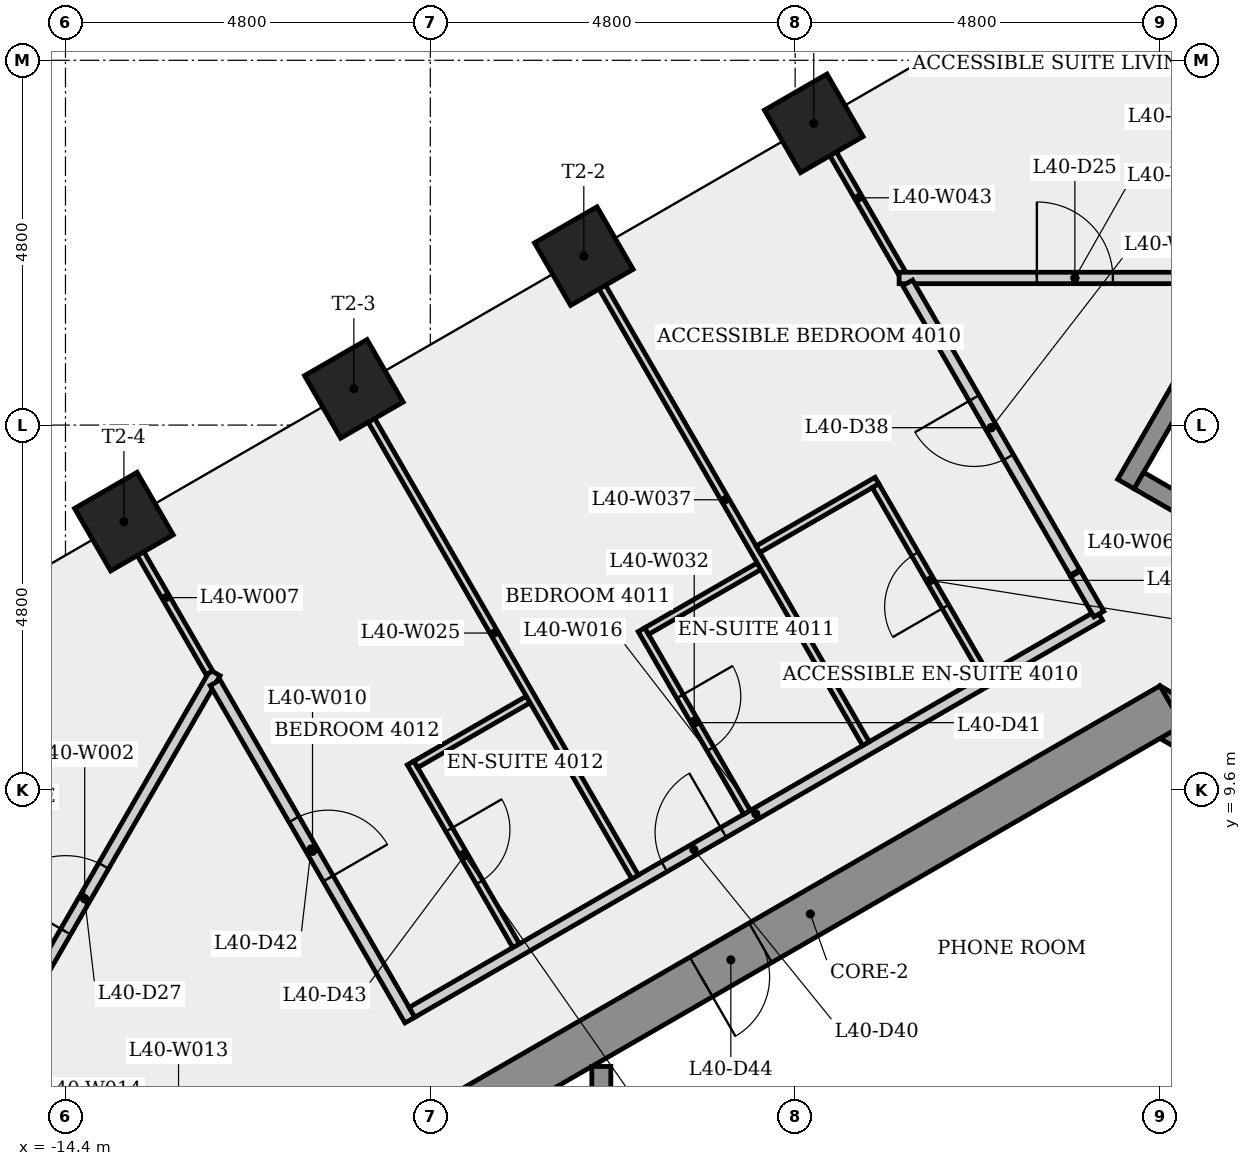
"""IFC4 building model, lengths in metres.
Left out: names, types, materials, properties, quantities, classifications, styles, units other than length and angle.
Written with IfcOpenShell. Run it as: python <this file> out.ifc"""

import sys

from ifc_helpers import new_model, si_unit, direction, frame, frame_2d, origin, origin_2d, place, context, subcontext, project, spatial, rectangle, extrude, element, fill, save


model = new_model("IFC4")
c1 = context("Model", 3, precision=1e-05, world=origin(), true_north=direction((0.0, 1.0)))
c2 = subcontext(c1, "Body", "Model", "MODEL_VIEW")
j1 = project(units=[si_unit("LENGTHUNIT", "METRE"), si_unit("PLANEANGLEUNIT", "RADIAN")], contexts=[c1])
p1 = place(None, origin())
s1 = spatial("IfcSite", under=j1, at=p1, CompositionType="ELEMENT")
p2 = place(p1, origin())
s2 = spatial("IfcBuilding", under=s1, at=p2, CompositionType="ELEMENT")
p3 = place(p2, frame((0.0, 0.0, 152.7)))
s3 = spatial("IfcBuildingStorey", under=s2, at=p3, CompositionType="ELEMENT", Elevation=152.7)
p4 = place(p3, frame((9.35, 5.225, 0.0), z_axis=(0.0, 0.0, 1.0), x_axis=(-0.866023993627, 0.500002442456, 0.0)))
e1 = element("IfcWall", 1, at=p4, inside=s3, PredefinedType="SHEAR", context=c2, shape_type="SweptSolid", body=[
    extrude(rectangle(XDim=10.97, YDim=0.6, at=frame_2d((5.485, 0.0))), origin(), (0.0, 0.0, 1.0), 3.4),
])
p5 = place(p4, frame((7.518, 0.0, 0.0)))
e2 = element("IfcOpeningElement", 2, at=p5, cuts=e1, PredefinedType="OPENING", context=c2, shape_type="SweptSolid", body=[
    extrude(rectangle(XDim=0.9, YDim=2.1, at=frame_2d((0.45, 1.05))), frame((0.0, 0.31, 0.0), z_axis=(0.0, -1.0, 0.0), x_axis=(1.0, 0.0, 0.0)), (0.0, 0.0, 1.0), 0.62),
])
p6 = place(p4, frame((1.172, 0.0, 0.0)))
e3 = element("IfcOpeningElement", 3, at=p6, cuts=e1, PredefinedType="OPENING", context=c2, shape_type="SweptSolid", body=[
    extrude(rectangle(XDim=0.9, YDim=2.1, at=frame_2d((0.45, 1.05))), frame((0.0, 0.31, 0.0), z_axis=(0.0, -1.0, 0.0), x_axis=(1.0, 0.0, 0.0)), (0.0, 0.0, 1.0), 0.62),
])
p7 = place(p3, frame((0.15, 10.71, 0.0), z_axis=(0.0, 0.0, 1.0), x_axis=(-0.866023993627, -0.500002442456, 0.0)))
e4 = element("IfcWall", 4, at=p7, inside=s3, PredefinedType="SHEAR", context=c2, shape_type="SweptSolid", body=[
    extrude(rectangle(XDim=10.97, YDim=0.6, at=frame_2d((5.485, 0.0))), origin(), (0.0, 0.0, 1.0), 3.4),
])
p8 = place(p7, frame((6.243, 0.0, 0.0)))
e5 = element("IfcOpeningElement", 5, at=p8, cuts=e4, PredefinedType="OPENING", context=c2, shape_type="SweptSolid", body=[
    extrude(rectangle(XDim=0.9, YDim=2.1, at=frame_2d((0.45, 1.05))), frame((0.0, 0.31, 0.0), z_axis=(0.0, -1.0, 0.0), x_axis=(1.0, 0.0, 0.0)), (0.0, 0.0, 1.0), 0.62),
])
for number, where, z_axis, x_axis in (
    (6, (-4.555, 18.37, 0.0), (0.0, 0.0, 1.0), (-0.5, 0.866, 0.0)),
    (7, (-7.581, 16.623, 0.0), (0.0, 0.0, 1.0), (-0.5, 0.866, 0.0)),
    (8, (-10.606, 14.877, 0.0), (0.0, 0.0, 1.0), (-0.5, 0.866, 0.0)),
    (9, (-13.631, 13.13, 0.0), (0.0, 0.0, 1.0), (-0.5, 0.866, 0.0)),
):
    element("IfcColumn", number, at=place(p3, frame(where, z_axis=z_axis, x_axis=x_axis)), inside=s3, PredefinedType="COLUMN", context=c2, shape_type="SweptSolid", body=[
        extrude(rectangle(XDim=0.95, YDim=0.95, at=origin_2d()), origin(), (0.0, 0.0, 1.0), 3.4),
    ])
p9 = place(p3, frame((-15.863, 5.196, 0.0), z_axis=(0.0, 0.0, 1.0), x_axis=(0.499991347294, 0.866030399369, 0.0)))
e10 = element("IfcWall", 10, at=p9, inside=s3, PredefinedType="PARTITIONING", context=c2, shape_type="SweptSolid", body=[
    extrude(rectangle(XDim=6.864, YDim=0.15, at=frame_2d((3.432, 0.0))), origin(), (0.0, 0.0, 1.0), 3.05),
])
p10 = place(p9, frame((2.932, 0.0, 0.0)))
e11 = element("IfcOpeningElement", 11, at=p10, cuts=e10, PredefinedType="OPENING", context=c2, shape_type="SweptSolid", body=[
    extrude(rectangle(XDim=1.0, YDim=2.1, at=frame_2d((0.5, 1.05))), frame((0.0, 0.085, 0.0), z_axis=(0.0, -1.0, 0.0), x_axis=(1.0, 0.0, 0.0)), (0.0, 0.0, 1.0), 0.17),
])
p11 = place(p3, frame((-13.649, 13.12, 0.0), z_axis=(0.0, 0.0, 1.0), x_axis=(0.499987504325, -0.866032618045, 0.0)))
e12 = element("IfcWall", 12, at=p11, inside=s3, PredefinedType="PARTITIONING", context=c2, shape_type="SweptSolid", body=[
    extrude(rectangle(XDim=2.286, YDim=0.1, at=frame_2d((1.143, 0.0))), origin(), (0.0, 0.0, 1.0), 3.05),
])
p12 = place(p3, frame((-12.431, 11.01, 0.0), z_axis=(0.0, 0.0, 1.0), x_axis=(0.500001430823, -0.866024577697, 0.0)))
e13 = element("IfcWall", 13, at=p12, inside=s3, PredefinedType="PARTITIONING", context=c2, shape_type="SweptSolid", body=[
    extrude(rectangle(XDim=5.126, YDim=0.15, at=frame_2d((2.563, 0.0))), origin(), (0.0, 0.0, 1.0), 3.05),
])
p13 = place(p12, frame((2.075, 0.0, 0.0)))
e14 = element("IfcOpeningElement", 14, at=p13, cuts=e13, PredefinedType="OPENING", context=c2, shape_type="SweptSolid", body=[
    extrude(rectangle(XDim=0.9, YDim=2.1, at=frame_2d((0.45, 1.05))), frame((0.0, 0.085, 0.0), z_axis=(0.0, -1.0, 0.0), x_axis=(1.0, 0.0, 0.0)), (0.0, 0.0, 1.0), 0.17),
])
p14 = place(p3, frame((-9.841, 6.674, 0.0), z_axis=(0.0, 0.0, 1.0), x_axis=(0.866024077368, 0.500002297414, 0.0)))
e15 = element("IfcWall", 15, at=p14, inside=s3, PredefinedType="PARTITIONING", context=c2, shape_type="SweptSolid", body=[
    extrude(rectangle(XDim=10.447, YDim=0.15, at=frame_2d((5.223, 0.0))), origin(), (0.0, 0.0, 1.0), 3.05),
])
p15 = place(p14, frame((3.832, 0.0, 0.0)))
e16 = element("IfcOpeningElement", 16, at=p15, cuts=e15, PredefinedType="OPENING", context=c2, shape_type="SweptSolid", body=[
    extrude(rectangle(XDim=0.9, YDim=2.1, at=frame_2d((0.45, 1.05))), frame((0.0, 0.085, 0.0), z_axis=(0.0, -1.0, 0.0), x_axis=(1.0, 0.0, 0.0)), (0.0, 0.0, 1.0), 0.17),
])
p16 = place(p3, frame((-9.859, 9.954, 0.0), z_axis=(0.0, 0.0, 1.0), x_axis=(0.499971228071, -0.866042014628, 0.0)))
e17 = element("IfcWall", 17, at=p16, inside=s3, PredefinedType="PARTITIONING", context=c2, shape_type="SweptSolid", body=[
    extrude(rectangle(XDim=2.775, YDim=0.1, at=frame_2d((1.388, 0.0))), origin(), (0.0, 0.0, 1.0), 3.05),
])
p17 = place(p16, frame((1.012, 0.0, 0.0)))
e18 = element("IfcOpeningElement", 18, at=p17, cuts=e17, PredefinedType="OPENING", context=c2, shape_type="SweptSolid", body=[
    extrude(rectangle(XDim=0.8, YDim=2.1, at=frame_2d((0.4, 1.05))), frame((0.0, 0.06, 0.0), z_axis=(0.0, -1.0, 0.0), x_axis=(1.0, 0.0, 0.0)), (0.0, 0.0, 1.0), 0.12),
])
p18 = place(p3, frame((-8.312, 10.79, 0.0), z_axis=(0.0, 0.0, 1.0), x_axis=(-0.866016478054, -0.500015459501, 0.0)))
e19 = element("IfcWall", 19, at=p18, inside=s3, PredefinedType="PARTITIONING", context=c2, shape_type="SweptSolid", body=[
    extrude(rectangle(XDim=1.707, YDim=0.1, at=frame_2d((0.854, 0.0))), origin(), (0.0, 0.0, 1.0), 3.05),
])
p19 = place(p3, frame((-10.612, 14.873, 0.0), z_axis=(0.0, 0.0, 1.0), x_axis=(0.499972430261, -0.866041320595, 0.0)))
e20 = element("IfcWall", 20, at=p19, inside=s3, PredefinedType="PARTITIONING", context=c2, shape_type="SweptSolid", body=[
    extrude(rectangle(XDim=7.412, YDim=0.1, at=frame_2d((3.706, 0.0))), origin(), (0.0, 0.0, 1.0), 3.05),
])
p20 = place(p3, frame((-7.35, 1.925, 0.0), z_axis=(0.0, 0.0, 1.0), x_axis=(0.0, 1.0, 0.0)))
e21 = element("IfcWall", 21, at=p20, inside=s3, PredefinedType="SHEAR", context=c2, shape_type="SweptSolid", body=[
    extrude(rectangle(XDim=4.036, YDim=0.25, at=frame_2d((2.018, 0.0))), origin(), (0.0, 0.0, 1.0), 3.05),
])
p21 = place(p3, frame((-6.821, 11.708, 0.0), z_axis=(0.0, 0.0, 1.0), x_axis=(0.50000932403, -0.866020020486, 0.0)))
e22 = element("IfcWall", 22, at=p21, inside=s3, PredefinedType="PARTITIONING", context=c2, shape_type="SweptSolid", body=[
    extrude(rectangle(XDim=2.775, YDim=0.1, at=frame_2d((1.387, 0.0))), origin(), (0.0, 0.0, 1.0), 3.05),
])
p22 = place(p21, frame((1.012, 0.0, 0.0)))
e23 = element("IfcOpeningElement", 23, at=p22, cuts=e22, PredefinedType="OPENING", context=c2, shape_type="SweptSolid", body=[
    extrude(rectangle(XDim=0.8, YDim=2.1, at=frame_2d((0.4, 1.05))), frame((0.0, 0.06, 0.0), z_axis=(0.0, -1.0, 0.0), x_axis=(1.0, 0.0, 0.0)), (0.0, 0.0, 1.0), 0.12),
])
p23 = place(p3, frame((-5.275, 12.543, 0.0), z_axis=(0.0, 0.0, 1.0), x_axis=(-0.86599030752, -0.500060783586, 0.0)))
e24 = element("IfcWall", 24, at=p23, inside=s3, PredefinedType="PARTITIONING", context=c2, shape_type="SweptSolid", body=[
    extrude(rectangle(XDim=1.707, YDim=0.1, at=frame_2d((0.854, 0.0))), origin(), (0.0, 0.0, 1.0), 3.05),
])
p24 = place(p3, frame((-7.575, 16.627, 0.0), z_axis=(0.0, 0.0, 1.0), x_axis=(0.500011399757, -0.866018822032, 0.0)))
e25 = element("IfcWall", 25, at=p24, inside=s3, PredefinedType="PARTITIONING", context=c2, shape_type="SweptSolid", body=[
    extrude(rectangle(XDim=7.411, YDim=0.1, at=frame_2d((3.706, 0.0))), origin(), (0.0, 0.0, 1.0), 3.05),
])
p25 = place(p3, frame((-3.723, 13.67, 0.0), z_axis=(0.0, 0.0, 1.0), x_axis=(-0.866048366499, -0.499960225302, 0.0)))
e26 = element("IfcWall", 26, at=p25, inside=s3, PredefinedType="PARTITIONING", context=c2, shape_type="SweptSolid", body=[
    extrude(rectangle(XDim=1.807, YDim=0.1, at=frame_2d((0.904, 0.0))), origin(), (0.0, 0.0, 1.0), 3.05),
])
p26 = place(p3, frame((-3.394, 16.401, 0.0), z_axis=(0.0, 0.0, 1.0), x_axis=(-0.500067608328, 0.865986366579, 0.0)))
e27 = element("IfcWall", 27, at=p26, inside=s3, PredefinedType="PARTITIONING", context=c2, shape_type="SweptSolid", body=[
    extrude(rectangle(XDim=2.286, YDim=0.1, at=frame_2d((1.143, 0.0))), origin(), (0.0, 0.0, 1.0), 3.05),
])
p27 = place(p3, frame((-3.432, 16.336, 0.0), z_axis=(0.0, 0.0, 1.0), x_axis=(1.0, 0.0, 0.0)))
e28 = element("IfcWall", 28, at=p27, inside=s3, PredefinedType="PARTITIONING", context=c2, shape_type="SweptSolid", body=[
    extrude(rectangle(XDim=4.625, YDim=0.15, at=frame_2d((2.312, 0.0))), origin(), (0.0, 0.0, 1.0), 3.05),
])
p28 = place(p27, frame((1.812, 0.0, 0.0)))
e29 = element("IfcOpeningElement", 29, at=p28, cuts=e28, PredefinedType="OPENING", context=c2, shape_type="SweptSolid", body=[
    extrude(rectangle(XDim=1.0, YDim=2.1, at=frame_2d((0.5, 1.05))), frame((0.0, 0.085, 0.0), z_axis=(0.0, -1.0, 0.0), x_axis=(1.0, 0.0, 0.0)), (0.0, 0.0, 1.0), 0.17),
])
p29 = place(p3, frame((-2.304, 11.112, 0.0), z_axis=(0.0, 0.0, 1.0), x_axis=(-0.500011588718, 0.866018712932, 0.0)))
e30 = element("IfcWall", 30, at=p29, inside=s3, PredefinedType="PARTITIONING", context=c2, shape_type="SweptSolid", body=[
    extrude(rectangle(XDim=2.875, YDim=0.1, at=frame_2d((1.438, 0.0))), origin(), (0.0, 0.0, 1.0), 3.05),
])
p30 = place(p29, frame((1.038, 0.0, 0.0)))
e31 = element("IfcOpeningElement", 31, at=p30, cuts=e30, PredefinedType="OPENING", context=c2, shape_type="SweptSolid", body=[
    extrude(rectangle(XDim=0.8, YDim=2.1, at=frame_2d((0.4, 1.05))), frame((0.0, 0.06, 0.0), z_axis=(0.0, -1.0, 0.0), x_axis=(1.0, 0.0, 0.0)), (0.0, 0.0, 1.0), 0.12),
])
p31 = place(p3, frame((-1.12, 12.461, 0.0), z_axis=(0.0, 0.0, 1.0), x_axis=(-0.499970631935, 0.866042358781, 0.0)))
e32 = element("IfcWall", 32, at=p31, inside=s3, PredefinedType="PARTITIONING", context=c2, shape_type="SweptSolid", body=[
    extrude(rectangle(XDim=4.4, YDim=0.15, at=frame_2d((2.2, 0.0))), origin(), (0.0, 0.0, 1.0), 3.05),
])
p32 = place(p31, frame((1.75, 0.0, 0.0)))
e33 = element("IfcOpeningElement", 33, at=p32, cuts=e32, PredefinedType="OPENING", context=c2, shape_type="SweptSolid", body=[
    extrude(rectangle(XDim=0.9, YDim=2.1, at=frame_2d((0.45, 1.05))), frame((0.0, 0.085, 0.0), z_axis=(0.0, -1.0, 0.0), x_axis=(1.0, 0.0, 0.0)), (0.0, 0.0, 1.0), 0.17),
])
p33 = place(p3, frame((-1.11, 12.443, 0.0), z_axis=(0.0, 0.0, 1.0), x_axis=(0.500264283676, -0.865872765756, 0.0)))
e34 = element("IfcWall", 34, at=p33, inside=s3, PredefinedType="PARTITIONING", context=c2, shape_type="SweptSolid", body=[
    extrude(rectangle(XDim=0.611, YDim=0.15, at=frame_2d((0.306, 0.0))), origin(), (0.0, 0.0, 1.0), 3.05),
])
p34 = place(p3, frame((-0.448, 13.624, 0.0), z_axis=(0.0, 0.0, 1.0), x_axis=(0.500037662692, 0.866003658127, 0.0)))
e35 = element("IfcWall", 35, at=p34, inside=s3, PredefinedType="SHEAR", context=c2, shape_type="SweptSolid", body=[
    extrude(rectangle(XDim=2.95, YDim=0.25, at=frame_2d((1.475, 0.0))), origin(), (0.0, 0.0, 1.0), 3.05),
])
p35 = place(p3, frame((2.581, 12.02, 0.0), z_axis=(0.0, 0.0, 1.0), x_axis=(-0.866040211805, 0.499974350878, 0.0)))
e36 = element("IfcWall", 36, at=p35, inside=s3, PredefinedType="SHEAR", context=c2, shape_type="SweptSolid", body=[
    extrude(rectangle(XDim=3.3, YDim=0.25, at=frame_2d((1.65, 0.0))), origin(), (0.0, 0.0, 1.0), 3.05),
])
p36 = place(p28, origin())
e37 = element("IfcDoor", 37, at=p36, inside=s3, OperationType="SINGLE_SWING_LEFT", PredefinedType="DOOR", context=c2, shape_type="SweptSolid", body=[
    extrude(rectangle(XDim=1.0, YDim=2.1, at=frame_2d((0.5, 1.05))), frame((0.0, 0.025, 0.0), z_axis=(0.0, -1.0, 0.0), x_axis=(1.0, 0.0, 0.0)), (0.0, 0.0, 1.0), 0.05),
])
fill(e29, e37)
p37 = place(p10, origin())
e38 = element("IfcDoor", 38, at=p37, inside=s3, OperationType="SINGLE_SWING_LEFT", PredefinedType="DOOR", context=c2, shape_type="SweptSolid", body=[
    extrude(rectangle(XDim=1.0, YDim=2.1, at=frame_2d((0.5, 1.05))), frame((0.0, 0.025, 0.0), z_axis=(0.0, -1.0, 0.0), x_axis=(1.0, 0.0, 0.0)), (0.0, 0.0, 1.0), 0.05),
])
fill(e11, e38)
p38 = place(p32, origin())
e39 = element("IfcDoor", 39, at=p38, inside=s3, OperationType="SINGLE_SWING_RIGHT", PredefinedType="DOOR", context=c2, shape_type="SweptSolid", body=[
    extrude(rectangle(XDim=0.9, YDim=2.1, at=frame_2d((0.45, 1.05))), frame((0.0, 0.025, 0.0), z_axis=(0.0, -1.0, 0.0), x_axis=(1.0, 0.0, 0.0)), (0.0, 0.0, 1.0), 0.05),
])
fill(e33, e39)
p39 = place(p30, origin())
e40 = element("IfcDoor", 40, at=p39, inside=s3, OperationType="SINGLE_SWING_LEFT", PredefinedType="DOOR", context=c2, shape_type="SweptSolid", body=[
    extrude(rectangle(XDim=0.8, YDim=2.1, at=frame_2d((0.4, 1.05))), frame((0.0, 0.025, 0.0), z_axis=(0.0, -1.0, 0.0), x_axis=(1.0, 0.0, 0.0)), (0.0, 0.0, 1.0), 0.05),
])
fill(e31, e40)
p40 = place(p15, origin())
e41 = element("IfcDoor", 41, at=p40, inside=s3, OperationType="SINGLE_SWING_RIGHT", PredefinedType="DOOR", context=c2, shape_type="SweptSolid", body=[
    extrude(rectangle(XDim=0.9, YDim=2.1, at=frame_2d((0.45, 1.05))), frame((0.0, 0.025, 0.0), z_axis=(0.0, -1.0, 0.0), x_axis=(1.0, 0.0, 0.0)), (0.0, 0.0, 1.0), 0.05),
])
fill(e16, e41)
p41 = place(p22, origin())
e42 = element("IfcDoor", 42, at=p41, inside=s3, OperationType="SINGLE_SWING_LEFT", PredefinedType="DOOR", context=c2, shape_type="SweptSolid", body=[
    extrude(rectangle(XDim=0.8, YDim=2.1, at=frame_2d((0.4, 1.05))), frame((0.0, 0.025, 0.0), z_axis=(0.0, -1.0, 0.0), x_axis=(1.0, 0.0, 0.0)), (0.0, 0.0, 1.0), 0.05),
])
fill(e23, e42)
p42 = place(p13, origin())
e43 = element("IfcDoor", 43, at=p42, inside=s3, OperationType="SINGLE_SWING_RIGHT", PredefinedType="DOOR", context=c2, shape_type="SweptSolid", body=[
    extrude(rectangle(XDim=0.9, YDim=2.1, at=frame_2d((0.45, 1.05))), frame((0.0, 0.025, 0.0), z_axis=(0.0, -1.0, 0.0), x_axis=(1.0, 0.0, 0.0)), (0.0, 0.0, 1.0), 0.05),
])
fill(e14, e43)
p43 = place(p17, origin())
e44 = element("IfcDoor", 44, at=p43, inside=s3, OperationType="SINGLE_SWING_LEFT", PredefinedType="DOOR", context=c2, shape_type="SweptSolid", body=[
    extrude(rectangle(XDim=0.8, YDim=2.1, at=frame_2d((0.4, 1.05))), frame((0.0, 0.025, 0.0), z_axis=(0.0, -1.0, 0.0), x_axis=(1.0, 0.0, 0.0)), (0.0, 0.0, 1.0), 0.05),
])
fill(e18, e44)
p44 = place(p8, origin())
e45 = element("IfcDoor", 45, at=p44, inside=s3, OperationType="SINGLE_SWING_RIGHT", PredefinedType="DOOR", context=c2, shape_type="SweptSolid", body=[
    extrude(rectangle(XDim=0.9, YDim=2.1, at=frame_2d((0.45, 1.05))), frame((0.0, 0.025, 0.0), z_axis=(0.0, -1.0, 0.0), x_axis=(1.0, 0.0, 0.0)), (0.0, 0.0, 1.0), 0.05),
])
fill(e5, e45)
save(model, sys.argv[1])
